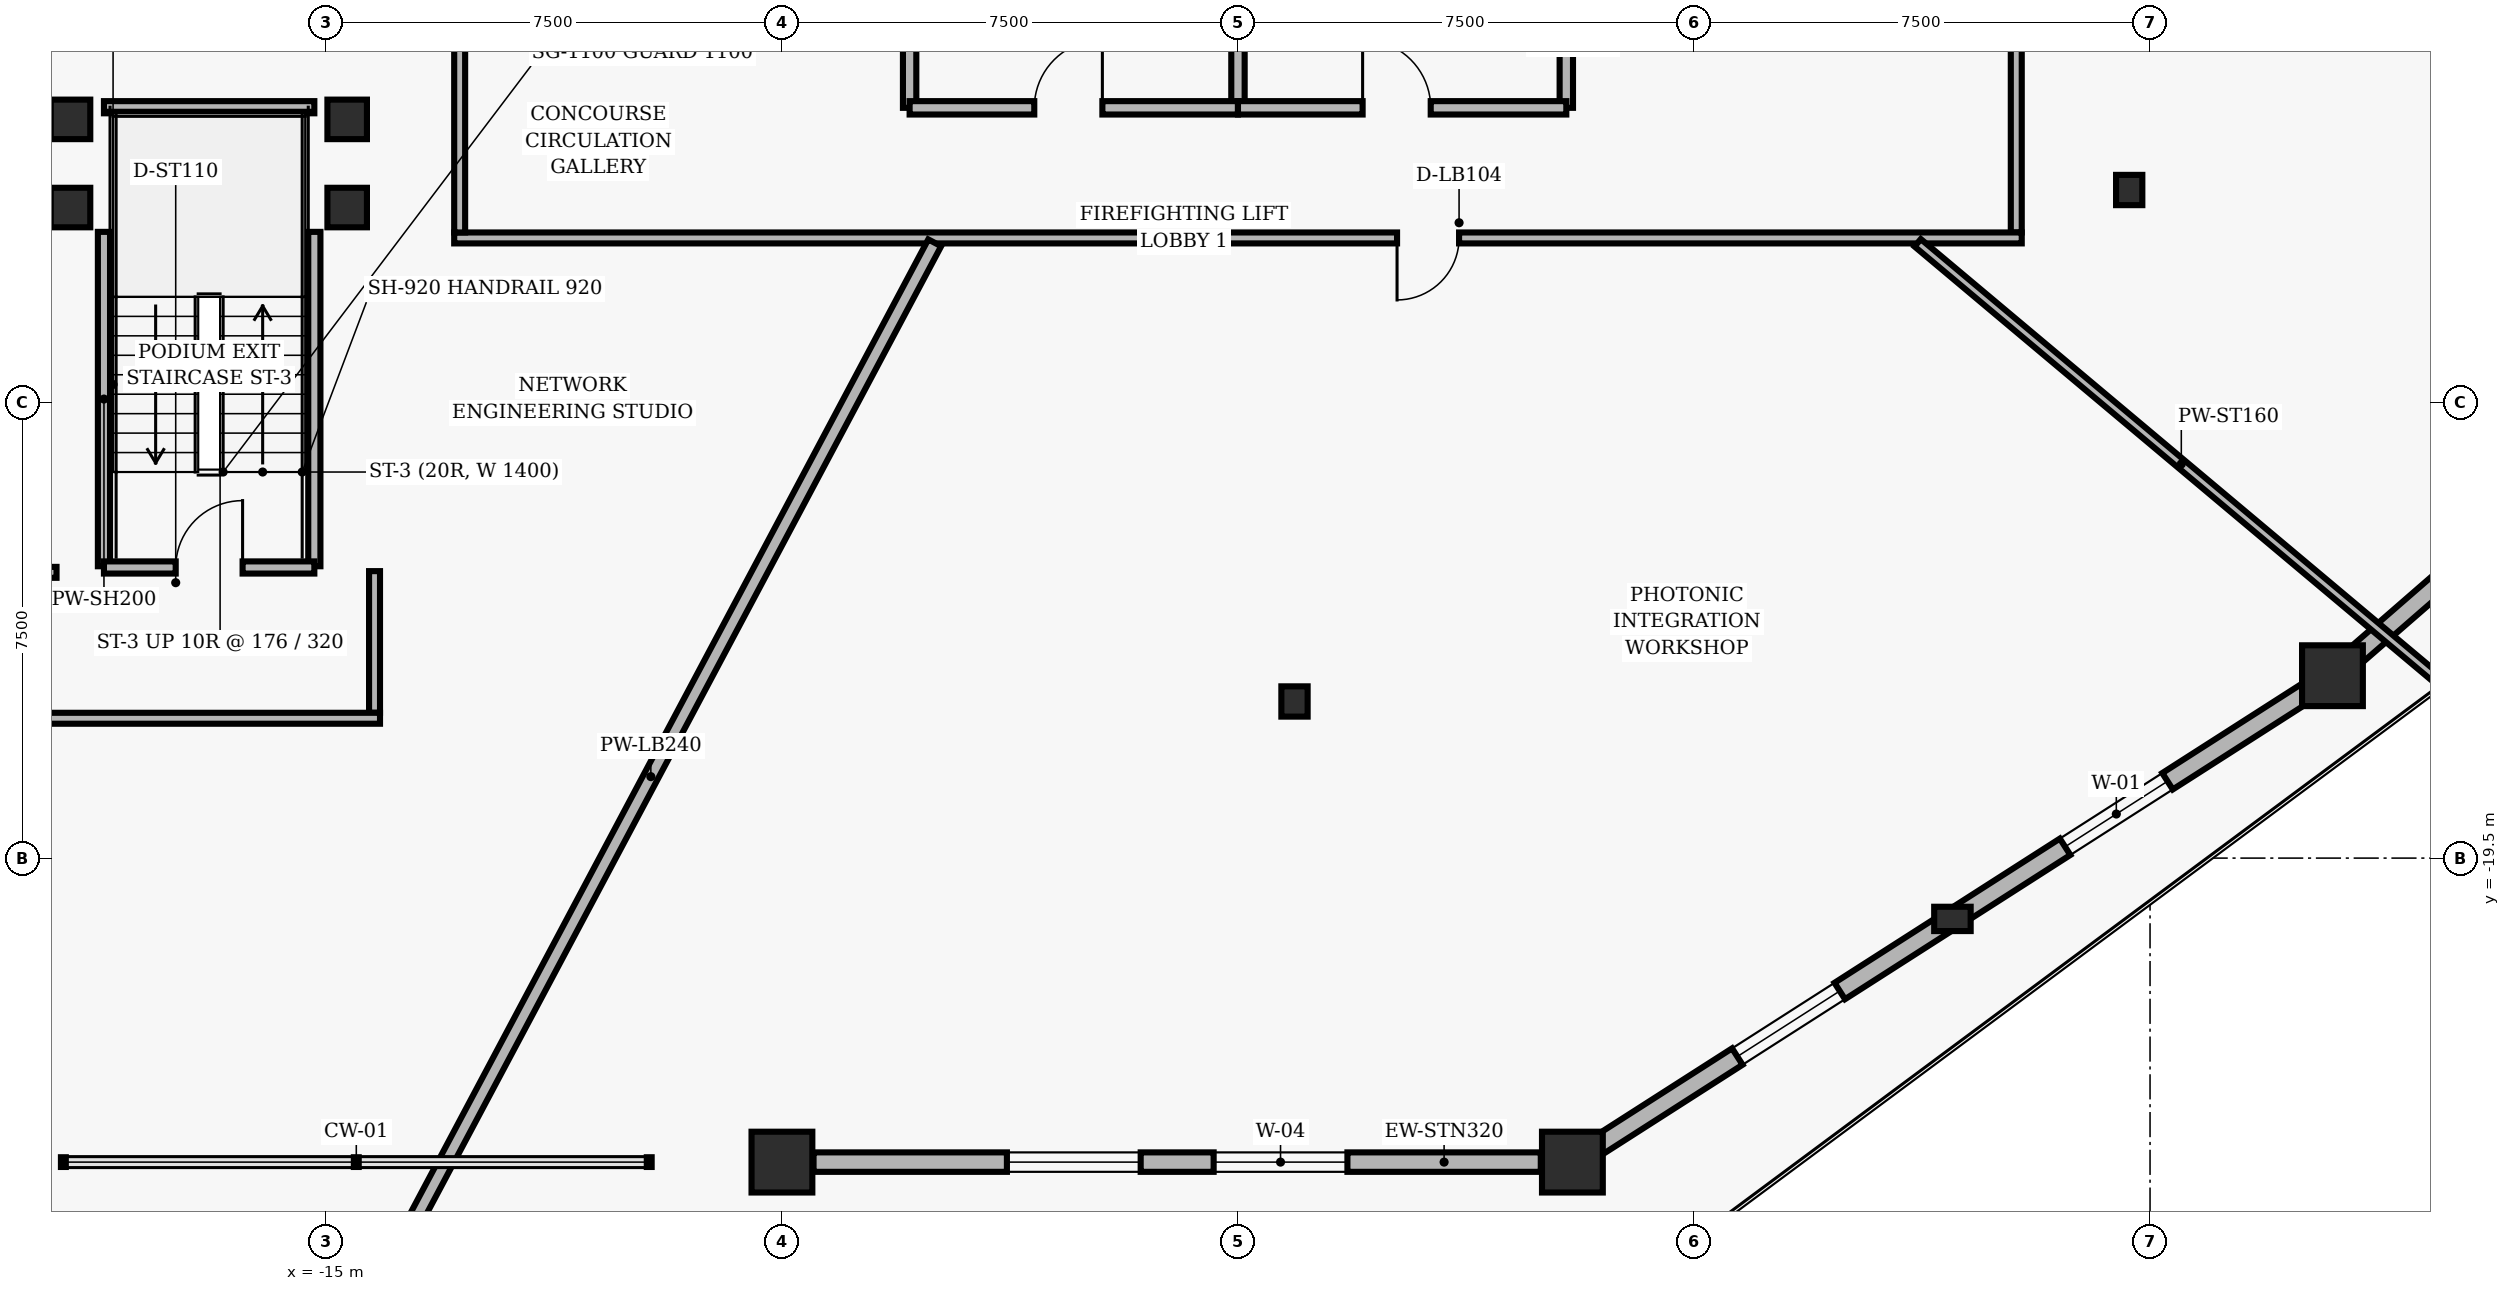
"""IFC4 building model, lengths in metres.
Left out: names, types, materials, properties, quantities, classifications, styles, units other than length and angle.
Written with IfcOpenShell. Run it as: python <this file> out.ifc"""

import sys

from ifc_helpers import new_model, si_unit, direction, frame, frame_2d, origin, origin_2d, place, context, subcontext, project, spatial, rectangle, i_section, extrude, element, fill, save


model = new_model("IFC4")
c1 = context("Model", 3, precision=1e-05, world=origin(), true_north=direction((0.0, 1.0)))
c2 = subcontext(c1, "Body", "Model", "MODEL_VIEW")
j1 = project(units=[si_unit("LENGTHUNIT", "METRE"), si_unit("PLANEANGLEUNIT", "RADIAN")], contexts=[c1])
p1 = place(None, origin())
s1 = spatial("IfcSite", under=j1, at=p1, CompositionType="ELEMENT")
p2 = place(p1, origin())
s2 = spatial("IfcBuilding", under=s1, at=p2, CompositionType="ELEMENT")
p3 = place(p2, frame((0.0, 0.0, 8.32)))
s3 = spatial("IfcBuildingStorey", under=s2, at=p3, CompositionType="ELEMENT", Elevation=8.32)
for number, where, z_axis, x_axis in (
    (1, (-7.5, -24.5, 0.0), (0.0, 0.0, 1.0), (1.0, 0.0, 0.0)),
    (2, (5.5, -24.5, 0.0), (0.0, 0.0, 1.0), (1.0, 0.0, 0.0)),
    (3, (18.0, -16.5, 0.0), (0.0, 0.0, 1.0), (1.0, 0.0, 0.0)),
):
    element("IfcColumn", number, at=place(p3, frame(where, z_axis=z_axis, x_axis=x_axis)), inside=s3, PredefinedType="COLUMN", context=c2, shape_type="SweptSolid", body=[
        extrude(rectangle(XDim=1.0, YDim=1.0, at=origin_2d()), origin(), (0.0, 0.0, 1.0), 3.52),
    ])
for number, where, z_axis, x_axis in (
    (4, (-19.2, -8.8, 0.0), (0.0, 0.0, 1.0), (1.0, 0.0, 0.0)),
    (5, (-14.65, -8.8, 0.0), (0.0, 0.0, 1.0), (1.0, 0.0, 0.0)),
    (6, (-19.2, -7.35, 0.0), (0.0, 0.0, 1.0), (1.0, 0.0, 0.0)),
    (7, (-14.65, -7.35, 0.0), (0.0, 0.0, 1.0), (1.0, 0.0, 0.0)),
):
    element("IfcColumn", number, at=place(p3, frame(where, z_axis=z_axis, x_axis=x_axis)), inside=s3, PredefinedType="COLUMN", context=c2, shape_type="SweptSolid", body=[
        extrude(rectangle(XDim=0.65, YDim=0.65, at=origin_2d()), origin(), (0.0, 0.0, 1.0), 3.52),
    ])
for number, where, z_axis, x_axis in (
    (8, (0.93, -16.924, 0.0), (0.0, 0.0, 1.0), (1.0, 0.0, 0.0)),
    (9, (14.657, -8.512, 0.0), (0.0, 0.0, 1.0), (1.0, 0.0, 0.0)),
):
    element("IfcColumn", number, at=place(p3, frame(where, z_axis=z_axis, x_axis=x_axis)), inside=s3, PredefinedType="COLUMN", context=c2, shape_type="SweptSolid", body=[
        extrude(i_section(OverallWidth=0.432, OverallDepth=0.498, WebThickness=0.056, FlangeThickness=0.089, FilletRadius=0.025, at=origin_2d()), origin(), (0.0, 0.0, 1.0), 3.52),
    ])
p4 = place(p3, frame((11.75, -20.5, 0.0), z_axis=(0.0, 0.0, 1.0), x_axis=(1.0, 0.0, 0.0)))
e10 = element("IfcColumn", 10, at=p4, inside=s3, PredefinedType="PILASTER", context=c2, shape_type="SweptSolid", body=[
    extrude(rectangle(XDim=0.6, YDim=0.4, at=origin_2d()), origin(), (0.0, 0.0, 1.0), 3.52),
])
p5 = place(p3, frame((4.98, -24.5, 0.0), z_axis=(0.0, 0.0, 1.0), x_axis=(-1.0, 0.0, 0.0)))
e11 = element("IfcWall", 11, at=p5, inside=s3, PredefinedType="SOLIDWALL", context=c2, shape_type="SweptSolid", body=[
    extrude(rectangle(XDim=11.96, YDim=0.32, at=frame_2d((5.98, 0.0))), origin(), (0.0, 0.0, 1.0), 2.588),
])
p6 = place(p5, frame((3.18, 0.0, 0.65)))
e12 = element("IfcOpeningElement", 12, at=p6, cuts=e11, PredefinedType="OPENING", context=c2, shape_type="SweptSolid", body=[
    extrude(rectangle(XDim=2.2, YDim=1.1, at=frame_2d((1.1, 0.55))), frame((0.0, 0.17, 0.0), z_axis=(0.0, -1.0, 0.0), x_axis=(1.0, 0.0, 0.0)), (0.0, 0.0, 1.0), 0.34),
])
p7 = place(p5, frame((6.58, 0.0, 0.65)))
e13 = element("IfcOpeningElement", 13, at=p7, cuts=e11, PredefinedType="OPENING", context=c2, shape_type="SweptSolid", body=[
    extrude(rectangle(XDim=2.2, YDim=1.1, at=frame_2d((1.1, 0.55))), frame((0.0, 0.17, 0.0), z_axis=(0.0, -1.0, 0.0), x_axis=(1.0, 0.0, 0.0)), (0.0, 0.0, 1.0), 0.34),
])
p8 = place(p3, frame((17.562, -16.78, 0.0), z_axis=(0.0, 0.0, 1.0), x_axis=(-0.842268830443, -0.539057712368, 0.0)))
e14 = element("IfcWall", 14, at=p8, inside=s3, PredefinedType="SOLIDWALL", context=c2, shape_type="SweptSolid", body=[
    extrude(rectangle(XDim=13.801, YDim=0.32, at=frame_2d((6.9, 0.0))), origin(), (0.0, 0.0, 1.0), 2.588),
])
p9 = place(p8, frame((2.7, 0.0, 0.65)))
e15 = element("IfcOpeningElement", 15, at=p9, cuts=e14, PredefinedType="OPENING", context=c2, shape_type="SweptSolid", body=[
    extrude(rectangle(XDim=2.0, YDim=1.6, at=frame_2d((1.0, 0.8))), frame((0.0, 0.17, 0.0), z_axis=(0.0, -1.0, 0.0), x_axis=(1.0, 0.0, 0.0)), (0.0, 0.0, 1.0), 0.34),
])
p10 = place(p8, frame((9.1, 0.0, 0.65)))
e16 = element("IfcOpeningElement", 16, at=p10, cuts=e14, PredefinedType="OPENING", context=c2, shape_type="SweptSolid", body=[
    extrude(rectangle(XDim=2.0, YDim=1.6, at=frame_2d((1.0, 0.8))), frame((0.0, 0.17, 0.0), z_axis=(0.0, -1.0, 0.0), x_axis=(1.0, 0.0, 0.0)), (0.0, 0.0, 1.0), 0.34),
])
p11 = place(p3, frame((29.108, -6.841, 0.0), z_axis=(0.0, 0.0, 1.0), x_axis=(-0.754615886195, -0.656166796098, 0.0)))
e17 = element("IfcWall", 17, at=p11, inside=s3, PredefinedType="SOLIDWALL", context=c2, shape_type="SweptSolid", body=[
    extrude(rectangle(XDim=14.2, YDim=0.32, at=frame_2d((7.1, 0.0))), origin(), (0.0, 0.0, 1.0), 2.261),
])
p12 = place(p11, frame((2.6, 0.0, 0.4)))
e18 = element("IfcOpeningElement", 18, at=p12, cuts=e17, PredefinedType="OPENING", context=c2, shape_type="SweptSolid", body=[
    extrude(rectangle(XDim=2.2, YDim=1.1, at=frame_2d((1.1, 0.55))), frame((0.0, 0.17, 0.0), z_axis=(0.0, -1.0, 0.0), x_axis=(1.0, 0.0, 0.0)), (0.0, 0.0, 1.0), 0.34),
])
p13 = place(p11, frame((6.0, 0.0, 0.4)))
e19 = element("IfcOpeningElement", 19, at=p13, cuts=e17, PredefinedType="OPENING", context=c2, shape_type="SweptSolid", body=[
    extrude(rectangle(XDim=2.2, YDim=1.1, at=frame_2d((1.1, 0.55))), frame((0.0, 0.17, 0.0), z_axis=(0.0, -1.0, 0.0), x_axis=(1.0, 0.0, 0.0)), (0.0, 0.0, 1.0), 0.34),
])
p14 = place(p11, frame((9.4, 0.0, 0.4)))
e20 = element("IfcOpeningElement", 20, at=p14, cuts=e17, PredefinedType="OPENING", context=c2, shape_type="SweptSolid", body=[
    extrude(rectangle(XDim=2.2, YDim=1.1, at=frame_2d((1.1, 0.55))), frame((0.0, 0.17, 0.0), z_axis=(0.0, -1.0, 0.0), x_axis=(1.0, 0.0, 0.0)), (0.0, 0.0, 1.0), 0.34),
])
for number, where, z_axis, x_axis in (
    (21, (-5.4, -7.16, 0.0), (0.0, 0.0, 1.0), (0.0, 1.0, 0.0)),
    (22, (5.4, -7.16, 0.0), (0.0, 0.0, 1.0), (0.0, 1.0, 0.0)),
):
    element("IfcWall", number, at=place(p3, frame(where, z_axis=z_axis, x_axis=x_axis)), inside=s3, PredefinedType="PARTITIONING", context=c2, shape_type="SweptSolid", body=[
        extrude(rectangle(XDim=2.71, YDim=0.22, at=frame_2d((1.355, 0.0))), origin(), (0.0, 0.0, 1.0), 3.193),
    ])
p15 = place(p3, frame((0.0, -7.16, 0.0), z_axis=(0.0, 0.0, 1.0), x_axis=(0.0, 1.0, 0.0)))
e23 = element("IfcWall", 23, at=p15, inside=s3, PredefinedType="PARTITIONING", context=c2, shape_type="SweptSolid", body=[
    extrude(rectangle(XDim=2.81, YDim=0.22, at=frame_2d((1.405, 0.0))), origin(), (0.0, 0.0, 1.0), 3.193),
])
p16 = place(p3, frame((-5.4, -7.16, 0.0), z_axis=(0.0, 0.0, 1.0), x_axis=(1.0, 0.0, 0.0)))
e24 = element("IfcWall", 24, at=p16, inside=s3, PredefinedType="PARTITIONING", context=c2, shape_type="SweptSolid", body=[
    extrude(rectangle(XDim=5.4, YDim=0.22, at=frame_2d((2.7, 0.0))), origin(), (0.0, 0.0, 1.0), 3.193),
])
p17 = place(p16, frame((2.05, 0.0, 0.0)))
e25 = element("IfcOpeningElement", 25, at=p17, cuts=e24, PredefinedType="OPENING", context=c2, shape_type="SweptSolid", body=[
    extrude(rectangle(XDim=1.12, YDim=2.02, at=frame_2d((0.56, 1.01))), frame((0.0, 0.12, 0.0), z_axis=(0.0, -1.0, 0.0), x_axis=(1.0, 0.0, 0.0)), (0.0, 0.0, 1.0), 0.24),
])
p18 = place(p3, frame((0.0, -7.16, 0.0), z_axis=(0.0, 0.0, 1.0), x_axis=(1.0, 0.0, 0.0)))
e26 = element("IfcWall", 26, at=p18, inside=s3, PredefinedType="PARTITIONING", context=c2, shape_type="SweptSolid", body=[
    extrude(rectangle(XDim=5.4, YDim=0.22, at=frame_2d((2.7, 0.0))), origin(), (0.0, 0.0, 1.0), 3.193),
])
p19 = place(p18, frame((2.05, 0.0, 0.0)))
e27 = element("IfcOpeningElement", 27, at=p19, cuts=e26, PredefinedType="OPENING", context=c2, shape_type="SweptSolid", body=[
    extrude(rectangle(XDim=1.12, YDim=2.02, at=frame_2d((0.56, 1.01))), frame((0.0, 0.12, 0.0), z_axis=(0.0, -1.0, 0.0), x_axis=(1.0, 0.0, 0.0)), (0.0, 0.0, 1.0), 0.24),
])
for number, where, z_axis, x_axis in (
    (28, (-18.65, -14.7, 0.0), (0.0, 0.0, 1.0), (0.0, 1.0, 0.0)),
    (29, (-15.19, -14.7, 0.0), (0.0, 0.0, 1.0), (0.0, 1.0, 0.0)),
):
    element("IfcWall", number, at=place(p3, frame(where, z_axis=z_axis, x_axis=x_axis)), inside=s3, PredefinedType="PARTITIONING", context=c2, shape_type="SweptSolid", body=[
        extrude(rectangle(XDim=5.5, YDim=0.2, at=frame_2d((2.75, 0.0))), origin(), (0.0, 0.0, 1.0), 3.193),
    ])
p20 = place(p3, frame((-18.65, -7.15, 0.0), z_axis=(0.0, 0.0, 1.0), x_axis=(1.0, 0.0, 0.0)))
e30 = element("IfcWall", 30, at=p20, inside=s3, PredefinedType="PARTITIONING", context=c2, shape_type="SweptSolid", body=[
    extrude(rectangle(XDim=3.46, YDim=0.2, at=frame_2d((1.73, 0.0))), origin(), (0.0, 0.0, 1.0), 1.3),
])
p21 = place(p3, frame((-18.65, -14.72, 0.0), z_axis=(0.0, 0.0, 1.0), x_axis=(1.0, 0.0, 0.0)))
e31 = element("IfcWall", 31, at=p21, inside=s3, PredefinedType="PARTITIONING", context=c2, shape_type="SweptSolid", body=[
    extrude(rectangle(XDim=3.46, YDim=0.2, at=frame_2d((1.73, 0.0))), origin(), (0.0, 0.0, 1.0), 3.193),
])
p22 = place(p21, frame((1.18, 0.0, 0.0)))
e32 = element("IfcOpeningElement", 32, at=p22, cuts=e31, PredefinedType="OPENING", context=c2, shape_type="SweptSolid", body=[
    extrude(rectangle(XDim=1.1, YDim=2.04, at=frame_2d((0.55, 1.02))), frame((0.0, 0.11, 0.0), z_axis=(0.0, -1.0, 0.0), x_axis=(1.0, 0.0, 0.0)), (0.0, 0.0, 1.0), 0.22),
])
p23 = place(p3, frame((12.8, -1.59, 0.0), z_axis=(0.0, 0.0, 1.0), x_axis=(0.0, -1.0, 0.0)))
e33 = element("IfcWall", 33, at=p23, inside=s3, PredefinedType="PARTITIONING", context=c2, shape_type="SweptSolid", body=[
    extrude(rectangle(XDim=7.62, YDim=0.18, at=frame_2d((3.81, 0.0))), origin(), (0.0, 0.0, 1.0), 3.193),
])
p24 = place(p3, frame((12.89, -9.3, 0.0), z_axis=(0.0, 0.0, 1.0), x_axis=(-1.0, 0.0, 0.0)))
e34 = element("IfcWall", 34, at=p24, inside=s3, PredefinedType="PARTITIONING", context=c2, shape_type="SweptSolid", body=[
    extrude(rectangle(XDim=25.78, YDim=0.18, at=frame_2d((12.89, 0.0))), origin(), (0.0, 0.0, 1.0), 2.76),
])
p25 = place(p24, frame((9.254, 0.0, 0.0)))
e35 = element("IfcOpeningElement", 35, at=p25, cuts=e34, PredefinedType="OPENING", context=c2, shape_type="SweptSolid", body=[
    extrude(rectangle(XDim=1.02, YDim=2.02, at=frame_2d((0.51, 1.01))), frame((0.0, 0.1, 0.0), z_axis=(0.0, -1.0, 0.0), x_axis=(1.0, 0.0, 0.0)), (0.0, 0.0, 1.0), 0.2),
])
p26 = place(p3, frame((-12.8, -9.21, 0.0), z_axis=(0.0, 0.0, 1.0), x_axis=(0.0, 1.0, 0.0)))
e36 = element("IfcWall", 36, at=p26, inside=s3, PredefinedType="PARTITIONING", context=c2, shape_type="SweptSolid", body=[
    extrude(rectangle(XDim=3.02, YDim=0.18, at=frame_2d((1.51, 0.0))), origin(), (0.0, 0.0, 1.0), 3.193),
])
p27 = place(p3, frame((-20.14, -14.8, 0.0), z_axis=(0.0, 0.0, 1.0), x_axis=(1.0, 0.0, 0.0)))
e37 = element("IfcWall", 37, at=p27, inside=s3, PredefinedType="PARTITIONING", context=c2, shape_type="SweptSolid", body=[
    extrude(rectangle(XDim=0.71, YDim=0.18, at=frame_2d((0.355, 0.0))), origin(), (0.0, 0.0, 1.0), 3.193),
])
p28 = place(p3, frame((-14.2, -14.78, 0.0), z_axis=(0.0, 0.0, 1.0), x_axis=(0.0, -1.0, 0.0)))
e38 = element("IfcWall", 38, at=p28, inside=s3, PredefinedType="PARTITIONING", context=c2, shape_type="SweptSolid", body=[
    extrude(rectangle(XDim=2.33, YDim=0.18, at=frame_2d((1.165, 0.0))), origin(), (0.0, 0.0, 1.0), 3.193),
])
p29 = place(p3, frame((-14.11, -17.2, 0.0), z_axis=(0.0, 0.0, 1.0), x_axis=(-1.0, 0.0, 0.0)))
e39 = element("IfcWall", 39, at=p29, inside=s3, PredefinedType="PARTITIONING", context=c2, shape_type="SweptSolid", body=[
    extrude(rectangle(XDim=5.96, YDim=0.18, at=frame_2d((2.98, 0.0))), origin(), (0.0, 0.0, 1.0), 3.193),
])
p30 = place(p3, frame((-4.987, -9.38, 0.0), z_axis=(0.0, 0.0, 1.0), x_axis=(-0.469474122014, -0.882946232088, 0.0)))
e40 = element("IfcWall", 40, at=p30, inside=s3, PredefinedType="PARTITIONING", context=c2, shape_type="SweptSolid", body=[
    extrude(rectangle(XDim=19.888, YDim=0.24, at=frame_2d((9.944, 0.0))), origin(), (0.0, 0.0, 1.0), 3.193),
])
p31 = place(p3, frame((11.179, -9.38, 0.0), z_axis=(0.0, 0.0, 1.0), x_axis=(0.766037025887, -0.642796449095, 0.0)))
e41 = element("IfcWall", 41, at=p31, inside=s3, PredefinedType="PARTITIONING", context=c2, shape_type="SweptSolid", body=[
    extrude(rectangle(XDim=11.32, YDim=0.16, at=frame_2d((5.66, 0.0))), origin(), (0.0, 0.0, 1.0), 2.246),
])
p32 = place(p6, origin())
e42 = element("IfcWindow", 42, at=p32, inside=s3, PartitioningType="SINGLE_PANEL", PredefinedType="WINDOW", context=c2, shape_type="SweptSolid", body=[
    extrude(rectangle(XDim=2.2, YDim=1.1, at=frame_2d((1.1, 0.55))), frame((0.0, 0.03, 0.0), z_axis=(0.0, -1.0, 0.0), x_axis=(1.0, 0.0, 0.0)), (0.0, 0.0, 1.0), 0.06),
])
fill(e12, e42)
p33 = place(p7, origin())
e43 = element("IfcWindow", 43, at=p33, inside=s3, PartitioningType="SINGLE_PANEL", PredefinedType="WINDOW", context=c2, shape_type="SweptSolid", body=[
    extrude(rectangle(XDim=2.2, YDim=1.1, at=frame_2d((1.1, 0.55))), frame((0.0, 0.03, 0.0), z_axis=(0.0, -1.0, 0.0), x_axis=(1.0, 0.0, 0.0)), (0.0, 0.0, 1.0), 0.06),
])
fill(e13, e43)
p34 = place(p9, origin())
e44 = element("IfcWindow", 44, at=p34, inside=s3, PartitioningType="SINGLE_PANEL", PredefinedType="WINDOW", context=c2, shape_type="SweptSolid", body=[
    extrude(rectangle(XDim=2.0, YDim=1.6, at=frame_2d((1.0, 0.8))), frame((0.0, 0.03, 0.0), z_axis=(0.0, -1.0, 0.0), x_axis=(1.0, 0.0, 0.0)), (0.0, 0.0, 1.0), 0.06),
])
fill(e15, e44)
p35 = place(p10, origin())
e45 = element("IfcWindow", 45, at=p35, inside=s3, PartitioningType="SINGLE_PANEL", PredefinedType="WINDOW", context=c2, shape_type="SweptSolid", body=[
    extrude(rectangle(XDim=2.0, YDim=1.6, at=frame_2d((1.0, 0.8))), frame((0.0, 0.03, 0.0), z_axis=(0.0, -1.0, 0.0), x_axis=(1.0, 0.0, 0.0)), (0.0, 0.0, 1.0), 0.06),
])
fill(e16, e45)
p36 = place(p17, origin())
e46 = element("IfcDoor", 46, at=p36, inside=s3, OperationType="SINGLE_SWING_RIGHT", PredefinedType="DOOR", context=c2, shape_type="SweptSolid", body=[
    extrude(rectangle(XDim=1.12, YDim=2.02, at=frame_2d((0.56, 1.01))), frame((0.0, 0.025, 0.0), z_axis=(0.0, -1.0, 0.0), x_axis=(1.0, 0.0, 0.0)), (0.0, 0.0, 1.0), 0.05),
])
fill(e25, e46)
p37 = place(p19, origin())
e47 = element("IfcDoor", 47, at=p37, inside=s3, OperationType="SINGLE_SWING_LEFT", PredefinedType="DOOR", context=c2, shape_type="SweptSolid", body=[
    extrude(rectangle(XDim=1.12, YDim=2.02, at=frame_2d((0.56, 1.01))), frame((0.0, 0.025, 0.0), z_axis=(0.0, -1.0, 0.0), x_axis=(1.0, 0.0, 0.0)), (0.0, 0.0, 1.0), 0.05),
])
fill(e27, e47)
p38 = place(p22, origin())
e48 = element("IfcDoor", 48, at=p38, inside=s3, OperationType="SINGLE_SWING_RIGHT", PredefinedType="DOOR", context=c2, shape_type="SweptSolid", body=[
    extrude(rectangle(XDim=1.1, YDim=2.04, at=frame_2d((0.55, 1.02))), frame((0.0, 0.025, 0.0), z_axis=(0.0, -1.0, 0.0), x_axis=(1.0, 0.0, 0.0)), (0.0, 0.0, 1.0), 0.05),
])
fill(e32, e48)
p39 = place(p25, origin())
e49 = element("IfcDoor", 49, at=p39, inside=s3, OperationType="SINGLE_SWING_RIGHT", PredefinedType="DOOR", context=c2, shape_type="SweptSolid", body=[
    extrude(rectangle(XDim=1.02, YDim=2.02, at=frame_2d((0.51, 1.01))), frame((0.0, 0.025, 0.0), z_axis=(0.0, -1.0, 0.0), x_axis=(1.0, 0.0, 0.0)), (0.0, 0.0, 1.0), 0.05),
])
fill(e35, e49)
save(model, sys.argv[1])
